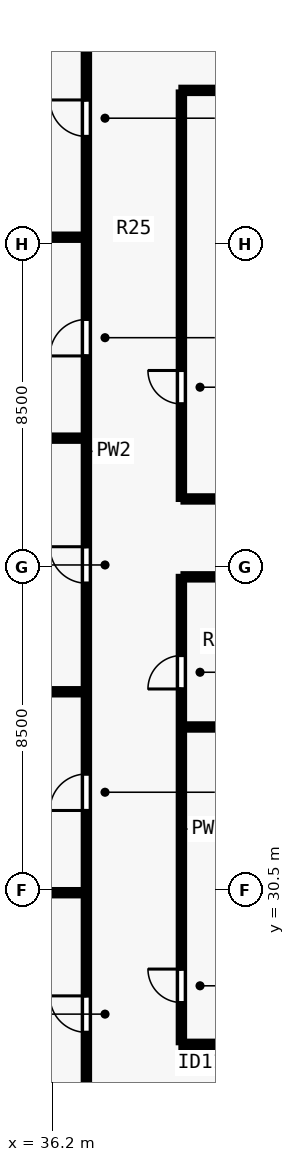
"""IFC4 building model, lengths in metres.
Left out: names, types, materials, properties, quantities, classifications, styles, units other than length and angle.
Written with IfcOpenShell. Run it as: python <this file> out.ifc"""

import sys

from ifc_helpers import new_model, si_unit, direction, frame, frame_2d, origin, place, context, subcontext, project, spatial, rectangle, extrude, element, fill, save


model = new_model("IFC4")
c1 = context("Model", 3, precision=1e-05, world=origin(), true_north=direction((0.0, 1.0)))
c2 = subcontext(c1, "Body", "Model", "MODEL_VIEW")
j1 = project(units=[si_unit("LENGTHUNIT", "METRE"), si_unit("PLANEANGLEUNIT", "RADIAN")], contexts=[c1])
p1 = place(None, origin())
s1 = spatial("IfcSite", under=j1, at=p1, CompositionType="ELEMENT")
p2 = place(p1, origin())
s2 = spatial("IfcBuilding", under=s1, at=p2, CompositionType="ELEMENT")
p3 = place(p2, frame((0.0, 0.0, 58.5)))
s3 = spatial("IfcBuildingStorey", under=s2, at=p3, CompositionType="ELEMENT", Elevation=58.5)
p4 = place(p3, frame((37.1, 24.005, 0.0), z_axis=(0.0, 0.0, 1.0), x_axis=(0.0, 1.0, 0.0)))
e1 = element("IfcWall", 1, at=p4, inside=s3, PredefinedType="PARTITIONING", context=c2, shape_type="SweptSolid", body=[
    extrude(rectangle(XDim=29.99, YDim=0.14, at=frame_2d((14.995, 0.0))), origin(), (0.0, 0.0, 1.0), 3.28),
])
p5 = place(p4, frame((2.76, 0.0, 0.0)))
e2 = element("IfcOpeningElement", 2, at=p5, cuts=e1, PredefinedType="OPENING", context=c2, shape_type="SweptSolid", body=[
    extrude(rectangle(XDim=0.96, YDim=2.12, at=frame_2d((0.48, 1.06))), frame((0.0, 0.08, 0.0), z_axis=(0.0, -1.0, 0.0), x_axis=(1.0, 0.0, 0.0)), (0.0, 0.0, 1.0), 0.16),
])
p6 = place(p4, frame((8.598, 0.0, 0.0)))
e3 = element("IfcOpeningElement", 3, at=p6, cuts=e1, PredefinedType="OPENING", context=c2, shape_type="SweptSolid", body=[
    extrude(rectangle(XDim=0.96, YDim=2.12, at=frame_2d((0.48, 1.06))), frame((0.0, 0.08, 0.0), z_axis=(0.0, -1.0, 0.0), x_axis=(1.0, 0.0, 0.0)), (0.0, 0.0, 1.0), 0.16),
])
p7 = place(p4, frame((14.578, 0.0, 0.0)))
e4 = element("IfcOpeningElement", 4, at=p7, cuts=e1, PredefinedType="OPENING", context=c2, shape_type="SweptSolid", body=[
    extrude(rectangle(XDim=0.96, YDim=2.12, at=frame_2d((0.48, 1.06))), frame((0.0, 0.08, 0.0), z_axis=(0.0, -1.0, 0.0), x_axis=(1.0, 0.0, 0.0)), (0.0, 0.0, 1.0), 0.16),
])
p8 = place(p4, frame((20.558, 0.0, 0.0)))
e5 = element("IfcOpeningElement", 5, at=p8, cuts=e1, PredefinedType="OPENING", context=c2, shape_type="SweptSolid", body=[
    extrude(rectangle(XDim=0.96, YDim=2.12, at=frame_2d((0.48, 1.06))), frame((0.0, 0.08, 0.0), z_axis=(0.0, -1.0, 0.0), x_axis=(1.0, 0.0, 0.0)), (0.0, 0.0, 1.0), 0.16),
])
p9 = place(p4, frame((26.333, 0.0, 0.0)))
e6 = element("IfcOpeningElement", 6, at=p9, cuts=e1, PredefinedType="OPENING", context=c2, shape_type="SweptSolid", body=[
    extrude(rectangle(XDim=0.96, YDim=2.12, at=frame_2d((0.48, 1.06))), frame((0.0, 0.08, 0.0), z_axis=(0.0, -1.0, 0.0), x_axis=(1.0, 0.0, 0.0)), (0.0, 0.0, 1.0), 0.16),
])
p10 = place(p3, frame((39.6, 26.45, 0.0), z_axis=(0.0, 0.0, 1.0), x_axis=(1.0, 0.0, 0.0)))
e7 = element("IfcWall", 7, at=p10, inside=s3, PredefinedType="PARTITIONING", context=c2, shape_type="SweptSolid", body=[
    extrude(rectangle(XDim=24.8, YDim=0.14, at=frame_2d((12.4, 0.0))), origin(), (0.0, 0.0, 1.0), 3.28),
])
p11 = place(p10, frame((2.2, 0.0, 0.0)))
e8 = element("IfcOpeningElement", 8, at=p11, cuts=e7, PredefinedType="OPENING", context=c2, shape_type="SweptSolid", body=[
    extrude(rectangle(XDim=0.96, YDim=2.12, at=frame_2d((0.48, 1.06))), frame((0.0, 0.08, 0.0), z_axis=(0.0, -1.0, 0.0), x_axis=(1.0, 0.0, 0.0)), (0.0, 0.0, 1.0), 0.16),
])
p12 = place(p10, frame((14.4, 0.0, 0.0)))
e9 = element("IfcOpeningElement", 9, at=p12, cuts=e7, PredefinedType="OPENING", context=c2, shape_type="SweptSolid", body=[
    extrude(rectangle(XDim=0.96, YDim=2.12, at=frame_2d((0.48, 1.06))), frame((0.0, 0.08, 0.0), z_axis=(0.0, -1.0, 0.0), x_axis=(1.0, 0.0, 0.0)), (0.0, 0.0, 1.0), 0.16),
])
p13 = place(p3, frame((39.6, 51.55, 0.0), z_axis=(0.0, 0.0, 1.0), x_axis=(1.0, 0.0, 0.0)))
e10 = element("IfcWall", 10, at=p13, inside=s3, PredefinedType="PARTITIONING", context=c2, shape_type="SweptSolid", body=[
    extrude(rectangle(XDim=24.8, YDim=0.14, at=frame_2d((12.4, 0.0))), origin(), (0.0, 0.0, 1.0), 3.28),
])
p14 = place(p13, frame((3.2, 0.0, 0.0)))
e11 = element("IfcOpeningElement", 11, at=p14, cuts=e10, PredefinedType="OPENING", context=c2, shape_type="SweptSolid", body=[
    extrude(rectangle(XDim=0.96, YDim=2.12, at=frame_2d((0.48, 1.06))), frame((0.0, 0.08, 0.0), z_axis=(0.0, -1.0, 0.0), x_axis=(1.0, 0.0, 0.0)), (0.0, 0.0, 1.0), 0.16),
])
p15 = place(p13, frame((18.4, 0.0, 0.0)))
e12 = element("IfcOpeningElement", 12, at=p15, cuts=e10, PredefinedType="OPENING", context=c2, shape_type="SweptSolid", body=[
    extrude(rectangle(XDim=0.96, YDim=2.12, at=frame_2d((0.48, 1.06))), frame((0.0, 0.08, 0.0), z_axis=(0.0, -1.0, 0.0), x_axis=(1.0, 0.0, 0.0)), (0.0, 0.0, 1.0), 0.16),
])
p16 = place(p3, frame((39.6, 26.505, 0.0), z_axis=(0.0, 0.0, 1.0), x_axis=(0.0, 1.0, 0.0)))
e13 = element("IfcWall", 13, at=p16, inside=s3, PredefinedType="PARTITIONING", context=c2, shape_type="SweptSolid", body=[
    extrude(rectangle(XDim=12.245, YDim=0.14, at=frame_2d((6.123, 0.0))), origin(), (0.0, 0.0, 1.0), 3.28),
])
p17 = place(p16, frame((1.045, 0.0, 0.0)))
e14 = element("IfcOpeningElement", 14, at=p17, cuts=e13, PredefinedType="OPENING", context=c2, shape_type="SweptSolid", body=[
    extrude(rectangle(XDim=0.88, YDim=2.1, at=frame_2d((0.44, 1.05))), frame((0.0, 0.08, 0.0), z_axis=(0.0, -1.0, 0.0), x_axis=(1.0, 0.0, 0.0)), (0.0, 0.0, 1.0), 0.16),
])
p18 = place(p16, frame((9.295, 0.0, 0.0)))
e15 = element("IfcOpeningElement", 15, at=p18, cuts=e13, PredefinedType="OPENING", context=c2, shape_type="SweptSolid", body=[
    extrude(rectangle(XDim=0.88, YDim=2.1, at=frame_2d((0.44, 1.05))), frame((0.0, 0.08, 0.0), z_axis=(0.0, -1.0, 0.0), x_axis=(1.0, 0.0, 0.0)), (0.0, 0.0, 1.0), 0.16),
])
p19 = place(p3, frame((39.6, 40.8, 0.0), z_axis=(0.0, 0.0, 1.0), x_axis=(0.0, 1.0, 0.0)))
e16 = element("IfcWall", 16, at=p19, inside=s3, PredefinedType="PARTITIONING", context=c2, shape_type="SweptSolid", body=[
    extrude(rectangle(XDim=10.695, YDim=0.14, at=frame_2d((5.348, 0.0))), origin(), (0.0, 0.0, 1.0), 3.28),
])
p20 = place(p19, frame((2.5, 0.0, 0.0)))
e17 = element("IfcOpeningElement", 17, at=p20, cuts=e16, PredefinedType="OPENING", context=c2, shape_type="SweptSolid", body=[
    extrude(rectangle(XDim=0.88, YDim=2.1, at=frame_2d((0.44, 1.05))), frame((0.0, 0.08, 0.0), z_axis=(0.0, -1.0, 0.0), x_axis=(1.0, 0.0, 0.0)), (0.0, 0.0, 1.0), 0.16),
])
for number, where, z_axis, x_axis in (
    (18, (39.655, 38.75, 0.0), (0.0, 0.0, 1.0), (1.0, 0.0, 0.0)),
    (19, (39.655, 40.8, 0.0), (0.0, 0.0, 1.0), (1.0, 0.0, 0.0)),
    (20, (39.655, 34.8, 0.0), (0.0, 0.0, 1.0), (1.0, 0.0, 0.0)),
):
    element("IfcWall", number, at=place(p3, frame(where, z_axis=z_axis, x_axis=x_axis)), inside=s3, PredefinedType="PARTITIONING", context=c2, shape_type="SweptSolid", body=[
        extrude(rectangle(XDim=3.585, YDim=0.14, at=frame_2d((1.792, 0.0))), origin(), (0.0, 0.0, 1.0), 3.28),
    ])
p21 = place(p3, frame((26.92, 30.439, 0.0), z_axis=(0.0, 0.0, 1.0), x_axis=(1.0, 0.0, 0.0)))
e21 = element("IfcWall", 21, at=p21, inside=s3, PredefinedType="PARTITIONING", context=c2, shape_type="SweptSolid", body=[
    extrude(rectangle(XDim=10.08, YDim=0.14, at=frame_2d((5.04, 0.0))), origin(), (0.0, 0.0, 1.0), 3.28),
])
p22 = place(p3, frame((26.92, 35.727, 0.0), z_axis=(0.0, 0.0, 1.0), x_axis=(1.0, 0.0, 0.0)))
e22 = element("IfcWall", 22, at=p22, inside=s3, PredefinedType="PARTITIONING", context=c2, shape_type="SweptSolid", body=[
    extrude(rectangle(XDim=10.08, YDim=0.14, at=frame_2d((5.04, 0.0))), origin(), (0.0, 0.0, 1.0), 2.849),
])
for number, where, z_axis, x_axis in (
    (23, (26.92, 42.399, 0.0), (0.0, 0.0, 1.0), (1.0, 0.0, 0.0)),
    (24, (26.92, 47.687, 0.0), (0.0, 0.0, 1.0), (1.0, 0.0, 0.0)),
):
    element("IfcWall", number, at=place(p3, frame(where, z_axis=z_axis, x_axis=x_axis)), inside=s3, PredefinedType="PARTITIONING", context=c2, shape_type="SweptSolid", body=[
        extrude(rectangle(XDim=10.08, YDim=0.14, at=frame_2d((5.04, 0.0))), origin(), (0.0, 0.0, 1.0), 3.28),
    ])
p23 = place(p17, origin())
e25 = element("IfcDoor", 25, at=p23, inside=s3, OperationType="SINGLE_SWING_RIGHT", PredefinedType="DOOR", context=c2, shape_type="SweptSolid", body=[
    extrude(rectangle(XDim=0.88, YDim=2.1, at=frame_2d((0.44, 1.05))), frame((0.0, 0.025, 0.0), z_axis=(0.0, -1.0, 0.0), x_axis=(1.0, 0.0, 0.0)), (0.0, 0.0, 1.0), 0.05),
])
fill(e14, e25)
p24 = place(p18, origin())
e26 = element("IfcDoor", 26, at=p24, inside=s3, OperationType="SINGLE_SWING_LEFT", PredefinedType="DOOR", context=c2, shape_type="SweptSolid", body=[
    extrude(rectangle(XDim=0.88, YDim=2.1, at=frame_2d((0.44, 1.05))), frame((0.0, 0.025, 0.0), z_axis=(0.0, -1.0, 0.0), x_axis=(1.0, 0.0, 0.0)), (0.0, 0.0, 1.0), 0.05),
])
fill(e15, e26)
p25 = place(p20, origin())
e27 = element("IfcDoor", 27, at=p25, inside=s3, OperationType="SINGLE_SWING_RIGHT", PredefinedType="DOOR", context=c2, shape_type="SweptSolid", body=[
    extrude(rectangle(XDim=0.88, YDim=2.1, at=frame_2d((0.44, 1.05))), frame((0.0, 0.025, 0.0), z_axis=(0.0, -1.0, 0.0), x_axis=(1.0, 0.0, 0.0)), (0.0, 0.0, 1.0), 0.05),
])
fill(e17, e27)
p26 = place(p5, origin())
e28 = element("IfcDoor", 28, at=p26, inside=s3, OperationType="SINGLE_SWING_RIGHT", PredefinedType="DOOR", context=c2, shape_type="SweptSolid", body=[
    extrude(rectangle(XDim=0.96, YDim=2.12, at=frame_2d((0.48, 1.06))), frame((0.0, 0.025, 0.0), z_axis=(0.0, -1.0, 0.0), x_axis=(1.0, 0.0, 0.0)), (0.0, 0.0, 1.0), 0.05),
])
fill(e2, e28)
p27 = place(p6, origin())
e29 = element("IfcDoor", 29, at=p27, inside=s3, OperationType="SINGLE_SWING_LEFT", PredefinedType="DOOR", context=c2, shape_type="SweptSolid", body=[
    extrude(rectangle(XDim=0.96, YDim=2.12, at=frame_2d((0.48, 1.06))), frame((0.0, 0.025, 0.0), z_axis=(0.0, -1.0, 0.0), x_axis=(1.0, 0.0, 0.0)), (0.0, 0.0, 1.0), 0.05),
])
fill(e3, e29)
p28 = place(p7, origin())
e30 = element("IfcDoor", 30, at=p28, inside=s3, OperationType="SINGLE_SWING_RIGHT", PredefinedType="DOOR", context=c2, shape_type="SweptSolid", body=[
    extrude(rectangle(XDim=0.96, YDim=2.12, at=frame_2d((0.48, 1.06))), frame((0.0, 0.025, 0.0), z_axis=(0.0, -1.0, 0.0), x_axis=(1.0, 0.0, 0.0)), (0.0, 0.0, 1.0), 0.05),
])
fill(e4, e30)
p29 = place(p8, origin())
e31 = element("IfcDoor", 31, at=p29, inside=s3, OperationType="SINGLE_SWING_LEFT", PredefinedType="DOOR", context=c2, shape_type="SweptSolid", body=[
    extrude(rectangle(XDim=0.96, YDim=2.12, at=frame_2d((0.48, 1.06))), frame((0.0, 0.025, 0.0), z_axis=(0.0, -1.0, 0.0), x_axis=(1.0, 0.0, 0.0)), (0.0, 0.0, 1.0), 0.05),
])
fill(e5, e31)
p30 = place(p9, origin())
e32 = element("IfcDoor", 32, at=p30, inside=s3, OperationType="SINGLE_SWING_RIGHT", PredefinedType="DOOR", context=c2, shape_type="SweptSolid", body=[
    extrude(rectangle(XDim=0.96, YDim=2.12, at=frame_2d((0.48, 1.06))), frame((0.0, 0.025, 0.0), z_axis=(0.0, -1.0, 0.0), x_axis=(1.0, 0.0, 0.0)), (0.0, 0.0, 1.0), 0.05),
])
fill(e6, e32)
save(model, sys.argv[1])
